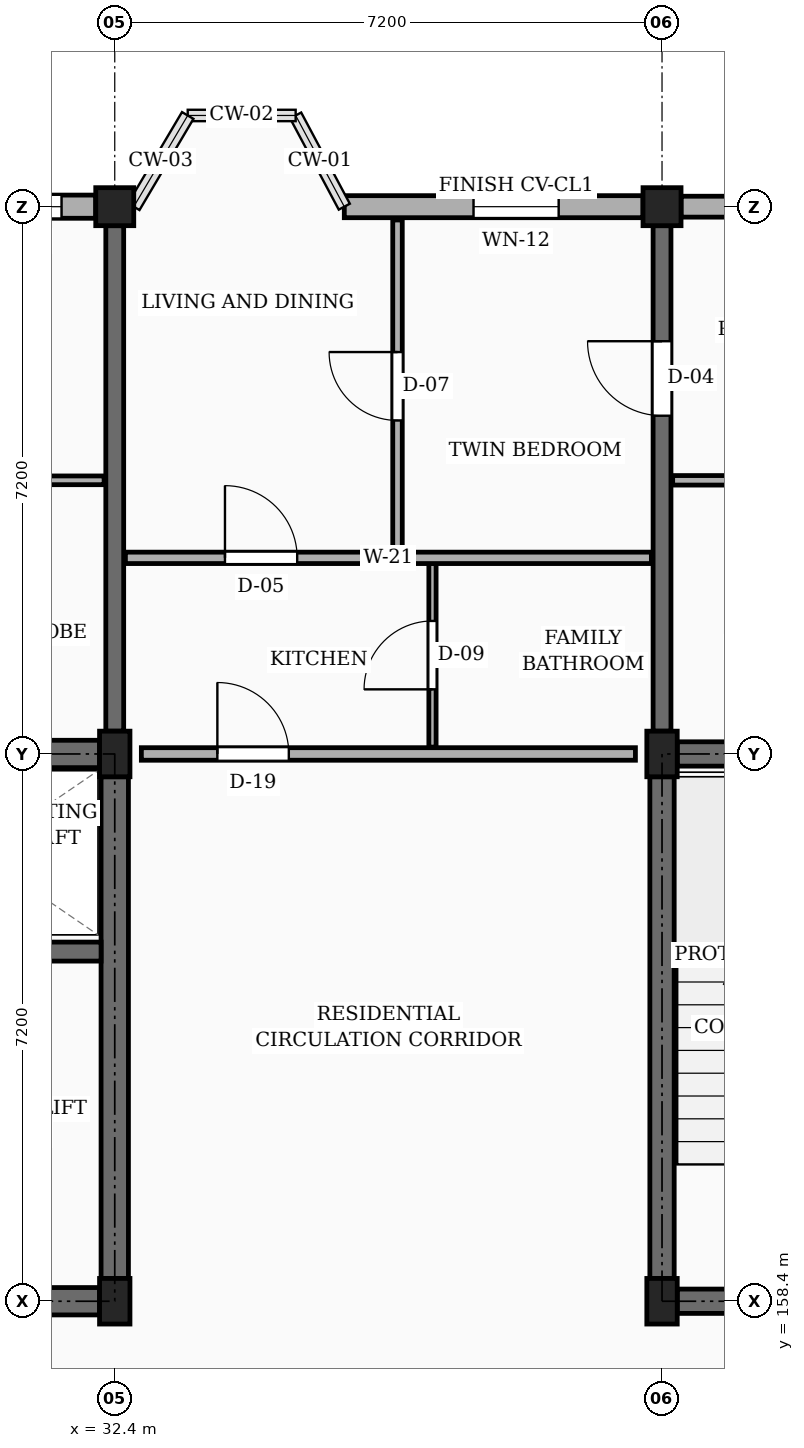
"""IFC4 building model, lengths in metres.
Left out: names, types, materials, properties, quantities, classifications, styles, units other than length and angle.
Written with IfcOpenShell. Run it as: python <this file> out.ifc"""

import sys

from ifc_helpers import new_model, si_unit, direction, frame, frame_2d, origin, origin_2d, place, context, subcontext, project, spatial, rectangle, extrude, element, fill, save


model = new_model("IFC4")
c1 = context("Model", 3, precision=1e-05, world=origin(), true_north=direction((0.0, 1.0)))
c2 = subcontext(c1, "Body", "Model", "MODEL_VIEW")
j1 = project(units=[si_unit("LENGTHUNIT", "METRE"), si_unit("PLANEANGLEUNIT", "RADIAN")], contexts=[c1])
p1 = place(None, origin())
s1 = spatial("IfcSite", under=j1, at=p1, CompositionType="ELEMENT")
p2 = place(p1, origin())
s2 = spatial("IfcBuilding", under=s1, at=p2, CompositionType="ELEMENT")
p3 = place(p2, frame((0.0, 0.0, 23.4)))
s3 = spatial("IfcBuildingStorey", under=s2, at=p3, CompositionType="ELEMENT", Elevation=23.4)
for number, where, z_axis, x_axis in (
    (1, (32.4, 158.4, 0.0), (0.0, 0.0, 1.0), (1.0, 0.0, 0.0)),
    (2, (32.4, 165.6, 0.0), (0.0, 0.0, 1.0), (1.0, 0.0, 0.0)),
):
    element("IfcColumn", number, at=place(p3, frame(where, z_axis=z_axis, x_axis=x_axis)), inside=s3, PredefinedType="COLUMN", context=c2, shape_type="SweptSolid", body=[
        extrude(rectangle(XDim=0.4, YDim=0.6, at=origin_2d()), origin(), (0.0, 0.0, 1.0), 3.15),
    ])
p4 = place(p3, frame((32.4, 172.8, 0.0), z_axis=(0.0, 0.0, 1.0), x_axis=(1.0, 0.0, 0.0)))
e3 = element("IfcColumn", 3, at=p4, inside=s3, PredefinedType="COLUMN", context=c2, shape_type="SweptSolid", body=[
    extrude(rectangle(XDim=0.5, YDim=0.5, at=origin_2d()), origin(), (0.0, 0.0, 1.0), 3.15),
])
for number, where, z_axis, x_axis in (
    (4, (39.6, 158.4, 0.0), (0.0, 0.0, 1.0), (1.0, 0.0, 0.0)),
    (5, (39.6, 165.6, 0.0), (0.0, 0.0, 1.0), (1.0, 0.0, 0.0)),
):
    element("IfcColumn", number, at=place(p3, frame(where, z_axis=z_axis, x_axis=x_axis)), inside=s3, PredefinedType="COLUMN", context=c2, shape_type="SweptSolid", body=[
        extrude(rectangle(XDim=0.4, YDim=0.6, at=origin_2d()), origin(), (0.0, 0.0, 1.0), 3.15),
    ])
p5 = place(p3, frame((39.6, 172.8, 0.0), z_axis=(0.0, 0.0, 1.0), x_axis=(1.0, 0.0, 0.0)))
e6 = element("IfcColumn", 6, at=p5, inside=s3, PredefinedType="COLUMN", context=c2, shape_type="SweptSolid", body=[
    extrude(rectangle(XDim=0.5, YDim=0.5, at=origin_2d()), origin(), (0.0, 0.0, 1.0), 3.15),
])
p6 = place(p3, frame((32.4, 165.9, 0.0), z_axis=(0.0, 0.0, 1.0), x_axis=(0.0, 1.0, 0.0)))
e7 = element("IfcWall", 7, at=p6, inside=s3, PredefinedType="SOLIDWALL", context=c2, shape_type="SweptSolid", body=[
    extrude(rectangle(XDim=6.65, YDim=0.235, at=frame_2d((3.325, 0.0))), origin(), (0.0, 0.0, 1.0), 2.185),
])
p7 = place(p3, frame((39.6, 165.9, 0.0), z_axis=(0.0, 0.0, 1.0), x_axis=(0.0, 1.0, 0.0)))
e8 = element("IfcWall", 8, at=p7, inside=s3, PredefinedType="SOLIDWALL", context=c2, shape_type="SweptSolid", body=[
    extrude(rectangle(XDim=6.65, YDim=0.235, at=frame_2d((3.325, 0.0))), origin(), (0.0, 0.0, 1.0), 2.185),
])
p8 = place(p7, frame((4.15, 0.0, 0.0)))
e9 = element("IfcOpeningElement", 9, at=p8, cuts=e8, PredefinedType="OPENING", context=c2, shape_type="SweptSolid", body=[
    extrude(rectangle(XDim=0.98, YDim=2.12, at=frame_2d((0.49, 1.06))), frame((0.0, 0.127, 0.0), z_axis=(0.0, -1.0, 0.0), x_axis=(1.0, 0.0, 0.0)), (0.0, 0.0, 1.0), 0.255),
])
p9 = place(p3, frame((46.55, 172.8, 0.0), z_axis=(0.0, 0.0, 1.0), x_axis=(-1.0, 0.0, 0.0)))
e10 = element("IfcWall", 10, at=p9, inside=s3, PredefinedType="SOLIDWALL", context=c2, shape_type="SweptSolid", body=[
    extrude(rectangle(XDim=6.7, YDim=0.275, at=frame_2d((3.35, 0.0))), origin(), (0.0, 0.0, 1.0), 2.455),
])
p10 = place(p9, frame((0.45, 0.0, 0.78)))
e11 = element("IfcOpeningElement", 11, at=p10, cuts=e10, PredefinedType="OPENING", context=c2, shape_type="SweptSolid", body=[
    extrude(rectangle(XDim=0.96, YDim=1.26, at=frame_2d((0.48, 0.63))), frame((0.0, 0.147, 0.0), z_axis=(0.0, -1.0, 0.0), x_axis=(1.0, 0.0, 0.0)), (0.0, 0.0, 1.0), 0.295),
])
p11 = place(p9, frame((4.65, 0.0, 0.78)))
e12 = element("IfcOpeningElement", 12, at=p11, cuts=e10, PredefinedType="OPENING", context=c2, shape_type="SweptSolid", body=[
    extrude(rectangle(XDim=1.12, YDim=1.26, at=frame_2d((0.56, 0.63))), frame((0.0, 0.147, 0.0), z_axis=(0.0, -1.0, 0.0), x_axis=(1.0, 0.0, 0.0)), (0.0, 0.0, 1.0), 0.295),
])
p12 = place(p3, frame((39.35, 172.8, 0.0), z_axis=(0.0, 0.0, 1.0), x_axis=(-1.0, 0.0, 0.0)))
e13 = element("IfcWall", 13, at=p12, inside=s3, PredefinedType="SOLIDWALL", context=c2, shape_type="SweptSolid", body=[
    extrude(rectangle(XDim=3.93, YDim=0.29, at=frame_2d((1.965, 0.0))), origin(), (0.0, 0.0, 1.0), 2.455),
])
p13 = place(p12, frame((1.11, 0.0, 0.78)))
e14 = element("IfcOpeningElement", 14, at=p13, cuts=e13, PredefinedType="OPENING", context=c2, shape_type="SweptSolid", body=[
    extrude(rectangle(XDim=1.12, YDim=1.26, at=frame_2d((0.56, 0.63))), frame((0.0, 0.155, 0.0), z_axis=(0.0, -1.0, 0.0), x_axis=(1.0, 0.0, 0.0)), (0.0, 0.0, 1.0), 0.31),
])
p14 = place(p3, frame((32.15, 172.8, 0.0), z_axis=(0.0, 0.0, 1.0), x_axis=(-1.0, 0.0, 0.0)))
e15 = element("IfcWall", 15, at=p14, inside=s3, PredefinedType="SOLIDWALL", context=c2, shape_type="SweptSolid", body=[
    extrude(rectangle(XDim=6.7, YDim=0.305, at=frame_2d((3.35, 0.0))), origin(), (0.0, 0.0, 1.0), 2.455),
])
p15 = place(p14, frame((0.45, 0.0, 0.78)))
e16 = element("IfcOpeningElement", 16, at=p15, cuts=e15, PredefinedType="OPENING", context=c2, shape_type="SweptSolid", body=[
    extrude(rectangle(XDim=1.2, YDim=1.26, at=frame_2d((0.6, 0.63))), frame((0.0, 0.163, 0.0), z_axis=(0.0, -1.0, 0.0), x_axis=(1.0, 0.0, 0.0)), (0.0, 0.0, 1.0), 0.325),
])
p16 = place(p14, frame((4.65, 0.0, 0.78)))
e17 = element("IfcOpeningElement", 17, at=p16, cuts=e15, PredefinedType="OPENING", context=c2, shape_type="SweptSolid", body=[
    extrude(rectangle(XDim=1.36, YDim=1.26, at=frame_2d((0.68, 0.63))), frame((0.0, 0.163, 0.0), z_axis=(0.0, -1.0, 0.0), x_axis=(1.0, 0.0, 0.0)), (0.0, 0.0, 1.0), 0.325),
])
p17 = place(p3, frame((25.4, 165.6, 0.0), z_axis=(0.0, 0.0, 1.0), x_axis=(1.0, 0.0, 0.0)))
e18 = element("IfcWall", 18, at=p17, inside=s3, PredefinedType="SHEAR", context=c2, shape_type="SweptSolid", body=[
    extrude(rectangle(XDim=6.8, YDim=0.36, at=frame_2d((3.4, 0.0))), origin(), (0.0, 0.0, 1.0), 2.885),
])
p18 = place(p3, frame((32.4, 158.7, 0.0), z_axis=(0.0, 0.0, 1.0), x_axis=(0.0, 1.0, 0.0)))
e19 = element("IfcWall", 19, at=p18, inside=s3, PredefinedType="SHEAR", context=c2, shape_type="SweptSolid", body=[
    extrude(rectangle(XDim=6.6, YDim=0.36, at=frame_2d((3.3, 0.0))), origin(), (0.0, 0.0, 1.0), 2.885),
])
p19 = place(p3, frame((25.4, 158.4, 0.0), z_axis=(0.0, 0.0, 1.0), x_axis=(1.0, 0.0, 0.0)))
e20 = element("IfcWall", 20, at=p19, inside=s3, PredefinedType="SHEAR", context=c2, shape_type="SweptSolid", body=[
    extrude(rectangle(XDim=6.8, YDim=0.36, at=frame_2d((3.4, 0.0))), origin(), (0.0, 0.0, 1.0), 2.885),
])
p20 = place(p19, frame((4.55, 0.0, 0.0)))
e21 = element("IfcOpeningElement", 21, at=p20, cuts=e20, PredefinedType="OPENING", context=c2, shape_type="SweptSolid", body=[
    extrude(rectangle(XDim=1.1, YDim=2.15, at=frame_2d((0.55, 1.075))), frame((0.0, 0.19, 0.0), z_axis=(0.0, -1.0, 0.0), x_axis=(1.0, 0.0, 0.0)), (0.0, 0.0, 1.0), 0.38),
])
p21 = place(p3, frame((28.925, 163.0, 0.0), z_axis=(0.0, 0.0, 1.0), x_axis=(1.0, 0.0, 0.0)))
e22 = element("IfcWall", 22, at=p21, inside=s3, PredefinedType="SHEAR", context=c2, shape_type="SweptSolid", body=[
    extrude(rectangle(XDim=3.295, YDim=0.25, at=frame_2d((1.647, 0.0))), origin(), (0.0, 0.0, 1.0), 2.885),
])
p22 = place(p21, frame((1.1, 0.0, 0.0)))
e23 = element("IfcOpeningElement", 23, at=p22, cuts=e22, PredefinedType="OPENING", context=c2, shape_type="SweptSolid", body=[
    extrude(rectangle(XDim=1.1, YDim=2.2, at=frame_2d((0.55, 1.1))), frame((0.0, 0.135, 0.0), z_axis=(0.0, -1.0, 0.0), x_axis=(1.0, 0.0, 0.0)), (0.0, 0.0, 1.0), 0.27),
])
p23 = place(p3, frame((39.6, 158.7, 0.0), z_axis=(0.0, 0.0, 1.0), x_axis=(0.0, 1.0, 0.0)))
e24 = element("IfcWall", 24, at=p23, inside=s3, PredefinedType="SHEAR", context=c2, shape_type="SweptSolid", body=[
    extrude(rectangle(XDim=6.6, YDim=0.32, at=frame_2d((3.3, 0.0))), origin(), (0.0, 0.0, 1.0), 2.885),
])
p24 = place(p3, frame((39.8, 165.6, 0.0), z_axis=(0.0, 0.0, 1.0), x_axis=(1.0, 0.0, 0.0)))
e25 = element("IfcWall", 25, at=p24, inside=s3, PredefinedType="SHEAR", context=c2, shape_type="SweptSolid", body=[
    extrude(rectangle(XDim=6.8, YDim=0.32, at=frame_2d((3.4, 0.0))), origin(), (0.0, 0.0, 1.0), 2.885),
])
p25 = place(p3, frame((39.8, 158.4, 0.0), z_axis=(0.0, 0.0, 1.0), x_axis=(1.0, 0.0, 0.0)))
e26 = element("IfcWall", 26, at=p25, inside=s3, PredefinedType="SHEAR", context=c2, shape_type="SweptSolid", body=[
    extrude(rectangle(XDim=6.8, YDim=0.32, at=frame_2d((3.4, 0.0))), origin(), (0.0, 0.0, 1.0), 2.885),
])
p26 = place(p25, frame((4.55, 0.0, 0.0)))
e27 = element("IfcOpeningElement", 27, at=p26, cuts=e26, PredefinedType="OPENING", context=c2, shape_type="SweptSolid", body=[
    extrude(rectangle(XDim=1.1, YDim=2.15, at=frame_2d((0.55, 1.075))), frame((0.0, 0.17, 0.0), z_axis=(0.0, -1.0, 0.0), x_axis=(1.0, 0.0, 0.0)), (0.0, 0.0, 1.0), 0.34),
])
p27 = place(p3, frame((32.75, 165.6, 0.0), z_axis=(0.0, 0.0, 1.0), x_axis=(1.0, 0.0, 0.0)))
e28 = element("IfcWall", 28, at=p27, inside=s3, PredefinedType="PARTITIONING", context=c2, shape_type="SweptSolid", body=[
    extrude(rectangle(XDim=6.5, YDim=0.165, at=frame_2d((3.25, 0.0))), origin(), (0.0, 0.0, 1.0), 2.32),
])
p28 = place(p27, frame((1.0, 0.0, 0.0)))
e29 = element("IfcOpeningElement", 29, at=p28, cuts=e28, PredefinedType="OPENING", context=c2, shape_type="SweptSolid", body=[
    extrude(rectangle(XDim=0.94, YDim=2.12, at=frame_2d((0.47, 1.06))), frame((0.0, 0.093, 0.0), z_axis=(0.0, -1.0, 0.0), x_axis=(1.0, 0.0, 0.0)), (0.0, 0.0, 1.0), 0.185),
])
p29 = place(p3, frame((25.34, 169.2, 0.0), z_axis=(0.0, 0.0, 1.0), x_axis=(1.0, 0.0, 0.0)))
e30 = element("IfcWall", 30, at=p29, inside=s3, PredefinedType="PARTITIONING", context=c2, shape_type="SweptSolid", body=[
    extrude(rectangle(XDim=6.92, YDim=0.115, at=frame_2d((3.46, 0.0))), origin(), (0.0, 0.0, 1.0), 2.32),
])
p30 = place(p29, frame((1.05, 0.0, 0.0)))
e31 = element("IfcOpeningElement", 31, at=p30, cuts=e30, PredefinedType="OPENING", context=c2, shape_type="SweptSolid", body=[
    extrude(rectangle(XDim=0.87, YDim=2.05, at=frame_2d((0.435, 1.025))), frame((0.0, 0.067, 0.0), z_axis=(0.0, -1.0, 0.0), x_axis=(1.0, 0.0, 0.0)), (0.0, 0.0, 1.0), 0.135),
])
p31 = place(p29, frame((4.45, 0.0, 0.0)))
e32 = element("IfcOpeningElement", 32, at=p31, cuts=e30, PredefinedType="OPENING", context=c2, shape_type="SweptSolid", body=[
    extrude(rectangle(XDim=0.88, YDim=2.08, at=frame_2d((0.44, 1.04))), frame((0.0, 0.067, 0.0), z_axis=(0.0, -1.0, 0.0), x_axis=(1.0, 0.0, 0.0)), (0.0, 0.0, 1.0), 0.135),
])
p32 = place(p3, frame((36.12, 168.25, 0.0), z_axis=(0.0, 0.0, 1.0), x_axis=(0.0, 1.0, 0.0)))
e33 = element("IfcWall", 33, at=p32, inside=s3, PredefinedType="PARTITIONING", context=c2, shape_type="SweptSolid", body=[
    extrude(rectangle(XDim=4.375, YDim=0.125, at=frame_2d((2.188, 0.0))), origin(), (0.0, 0.0, 1.0), 2.32),
])
p33 = place(p32, frame((1.738, 0.0, 0.0)))
e34 = element("IfcOpeningElement", 34, at=p33, cuts=e33, PredefinedType="OPENING", context=c2, shape_type="SweptSolid", body=[
    extrude(rectangle(XDim=0.9, YDim=2.1, at=frame_2d((0.45, 1.05))), frame((0.0, 0.073, 0.0), z_axis=(0.0, -1.0, 0.0), x_axis=(1.0, 0.0, 0.0)), (0.0, 0.0, 1.0), 0.145),
])
p34 = place(p3, frame((36.58, 165.69, 0.0), z_axis=(0.0, 0.0, 1.0), x_axis=(0.0, 1.0, 0.0)))
e35 = element("IfcWall", 35, at=p34, inside=s3, PredefinedType="PARTITIONING", context=c2, shape_type="SweptSolid", body=[
    extrude(rectangle(XDim=2.42, YDim=0.095, at=frame_2d((1.21, 0.0))), origin(), (0.0, 0.0, 1.0), 2.32),
])
p35 = place(p34, frame((0.76, 0.0, 0.0)))
e36 = element("IfcOpeningElement", 36, at=p35, cuts=e35, PredefinedType="OPENING", context=c2, shape_type="SweptSolid", body=[
    extrude(rectangle(XDim=0.9, YDim=2.05, at=frame_2d((0.45, 1.025))), frame((0.0, 0.058, 0.0), z_axis=(0.0, -1.0, 0.0), x_axis=(1.0, 0.0, 0.0)), (0.0, 0.0, 1.0), 0.115),
])
p36 = place(p3, frame((32.54, 168.18, 0.0), z_axis=(0.0, 0.0, 1.0), x_axis=(1.0, 0.0, 0.0)))
e37 = element("IfcWall", 37, at=p36, inside=s3, PredefinedType="PARTITIONING", context=c2, shape_type="SweptSolid", body=[
    extrude(rectangle(XDim=6.92, YDim=0.15, at=frame_2d((3.46, 0.0))), origin(), (0.0, 0.0, 1.0), 2.32),
])
p37 = place(p36, frame((1.31, 0.0, 0.0)))
e38 = element("IfcOpeningElement", 38, at=p37, cuts=e37, PredefinedType="OPENING", context=c2, shape_type="SweptSolid", body=[
    extrude(rectangle(XDim=0.95, YDim=2.1, at=frame_2d((0.475, 1.05))), frame((0.0, 0.085, 0.0), z_axis=(0.0, -1.0, 0.0), x_axis=(1.0, 0.0, 0.0)), (0.0, 0.0, 1.0), 0.17),
])
p38 = place(p3, frame((39.74, 169.2, 0.0), z_axis=(0.0, 0.0, 1.0), x_axis=(1.0, 0.0, 0.0)))
e39 = element("IfcWall", 39, at=p38, inside=s3, PredefinedType="PARTITIONING", context=c2, shape_type="SweptSolid", body=[
    extrude(rectangle(XDim=6.92, YDim=0.125, at=frame_2d((3.46, 0.0))), origin(), (0.0, 0.0, 1.0), 2.32),
])
p39 = place(p38, frame((1.05, 0.0, 0.0)))
e40 = element("IfcOpeningElement", 40, at=p39, cuts=e39, PredefinedType="OPENING", context=c2, shape_type="SweptSolid", body=[
    extrude(rectangle(XDim=0.87, YDim=2.05, at=frame_2d((0.435, 1.025))), frame((0.0, 0.073, 0.0), z_axis=(0.0, -1.0, 0.0), x_axis=(1.0, 0.0, 0.0)), (0.0, 0.0, 1.0), 0.145),
])
p40 = place(p38, frame((4.45, 0.0, 0.0)))
e41 = element("IfcOpeningElement", 41, at=p40, cuts=e39, PredefinedType="OPENING", context=c2, shape_type="SweptSolid", body=[
    extrude(rectangle(XDim=0.88, YDim=2.08, at=frame_2d((0.44, 1.04))), frame((0.0, 0.073, 0.0), z_axis=(0.0, -1.0, 0.0), x_axis=(1.0, 0.0, 0.0)), (0.0, 0.0, 1.0), 0.145),
])
p41 = place(p13, origin())
e42 = element("IfcWindow", 42, at=p41, inside=s3, PartitioningType="SINGLE_PANEL", PredefinedType="WINDOW", context=c2, shape_type="SweptSolid", body=[
    extrude(rectangle(XDim=1.12, YDim=1.26, at=frame_2d((0.56, 0.63))), frame((0.0, 0.03, 0.0), z_axis=(0.0, -1.0, 0.0), x_axis=(1.0, 0.0, 0.0)), (0.0, 0.0, 1.0), 0.06),
])
fill(e14, e42)
p42 = place(p15, origin())
e43 = element("IfcWindow", 43, at=p42, inside=s3, PartitioningType="SINGLE_PANEL", PredefinedType="WINDOW", context=c2, shape_type="SweptSolid", body=[
    extrude(rectangle(XDim=1.2, YDim=1.26, at=frame_2d((0.6, 0.63))), frame((0.0, 0.03, 0.0), z_axis=(0.0, -1.0, 0.0), x_axis=(1.0, 0.0, 0.0)), (0.0, 0.0, 1.0), 0.06),
])
fill(e16, e43)
p43 = place(p28, origin())
e44 = element("IfcDoor", 44, at=p43, inside=s3, OperationType="SINGLE_SWING_LEFT", PredefinedType="DOOR", context=c2, shape_type="SweptSolid", body=[
    extrude(rectangle(XDim=0.94, YDim=2.12, at=frame_2d((0.47, 1.06))), frame((0.0, 0.025, 0.0), z_axis=(0.0, -1.0, 0.0), x_axis=(1.0, 0.0, 0.0)), (0.0, 0.0, 1.0), 0.05),
])
fill(e29, e44)
p44 = place(p33, origin())
e45 = element("IfcDoor", 45, at=p44, inside=s3, OperationType="SINGLE_SWING_RIGHT", PredefinedType="DOOR", context=c2, shape_type="SweptSolid", body=[
    extrude(rectangle(XDim=0.9, YDim=2.1, at=frame_2d((0.45, 1.05))), frame((0.0, 0.025, 0.0), z_axis=(0.0, -1.0, 0.0), x_axis=(1.0, 0.0, 0.0)), (0.0, 0.0, 1.0), 0.05),
])
fill(e34, e45)
p45 = place(p35, origin())
e46 = element("IfcDoor", 46, at=p45, inside=s3, OperationType="SINGLE_SWING_LEFT", PredefinedType="DOOR", context=c2, shape_type="SweptSolid", body=[
    extrude(rectangle(XDim=0.9, YDim=2.05, at=frame_2d((0.45, 1.025))), frame((0.0, 0.025, 0.0), z_axis=(0.0, -1.0, 0.0), x_axis=(1.0, 0.0, 0.0)), (0.0, 0.0, 1.0), 0.05),
])
fill(e36, e46)
p46 = place(p37, origin())
e47 = element("IfcDoor", 47, at=p46, inside=s3, OperationType="SINGLE_SWING_LEFT", PredefinedType="DOOR", context=c2, shape_type="SweptSolid", body=[
    extrude(rectangle(XDim=0.95, YDim=2.1, at=frame_2d((0.475, 1.05))), frame((0.0, 0.025, 0.0), z_axis=(0.0, -1.0, 0.0), x_axis=(1.0, 0.0, 0.0)), (0.0, 0.0, 1.0), 0.05),
])
fill(e38, e47)
p47 = place(p8, origin())
e48 = element("IfcDoor", 48, at=p47, inside=s3, OperationType="SINGLE_SWING_RIGHT", PredefinedType="DOOR", context=c2, shape_type="SweptSolid", body=[
    extrude(rectangle(XDim=0.98, YDim=2.12, at=frame_2d((0.49, 1.06))), frame((0.0, 0.025, 0.0), z_axis=(0.0, -1.0, 0.0), x_axis=(1.0, 0.0, 0.0)), (0.0, 0.0, 1.0), 0.05),
])
fill(e9, e48)
save(model, sys.argv[1])
